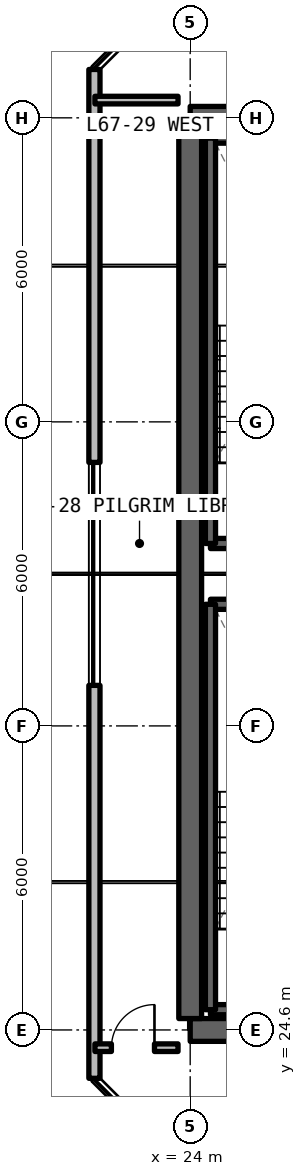
"""IFC4 building model, lengths in metres.
Left out: names, types, materials, properties, quantities, classifications, styles, units other than length and angle.
Written with IfcOpenShell. Run it as: python <this file> out.ifc"""

import sys

from ifc_helpers import new_model, si_unit, direction, frame, frame_2d, origin, place, context, subcontext, project, spatial, rectangle, extrude, element, fill, save


model = new_model("IFC4")
c1 = context("Model", 3, precision=1e-05, world=origin(), true_north=direction((0.0, 1.0)))
c2 = subcontext(c1, "Body", "Model", "MODEL_VIEW")
j1 = project(units=[si_unit("LENGTHUNIT", "METRE"), si_unit("PLANEANGLEUNIT", "RADIAN")], contexts=[c1])
p1 = place(None, origin())
s1 = spatial("IfcSite", under=j1, at=p1, CompositionType="ELEMENT")
p2 = place(p1, origin())
s2 = spatial("IfcBuilding", under=s1, at=p2, CompositionType="ELEMENT")
p3 = place(p2, frame((0.0, 0.0, 239.25)))
s3 = spatial("IfcBuildingStorey", under=s2, at=p3, CompositionType="ELEMENT", Elevation=239.25)
p4 = place(p3, frame((24.0, 24.6, 0.0), z_axis=(0.0, 0.0, 1.0), x_axis=(1.0, 0.0, 0.0)))
e1 = element("IfcWall", 1, at=p4, inside=s3, PredefinedType="SHEAR", context=c2, shape_type="SweptSolid", body=[
    extrude(rectangle(XDim=12.0, YDim=0.45, at=frame_2d((6.0, 0.0))), origin(), (0.0, 0.0, 1.0), 3.3),
])
p5 = place(p4, frame((7.2, 0.0, 0.0)))
e2 = element("IfcOpeningElement", 2, at=p5, cuts=e1, PredefinedType="OPENING", context=c2, shape_type="SweptSolid", body=[
    extrude(rectangle(XDim=1.0, YDim=2.15, at=frame_2d((0.5, 1.075))), frame((0.0, 0.235, 0.0), z_axis=(0.0, -1.0, 0.0), x_axis=(1.0, 0.0, 0.0)), (0.0, 0.0, 1.0), 0.47),
])
p6 = place(p3, frame((36.0, 42.6, 0.0), z_axis=(0.0, 0.0, 1.0), x_axis=(-1.0, 0.0, 0.0)))
e3 = element("IfcWall", 3, at=p6, inside=s3, PredefinedType="SHEAR", context=c2, shape_type="SweptSolid", body=[
    extrude(rectangle(XDim=12.0, YDim=0.45, at=frame_2d((6.0, 0.0))), origin(), (0.0, 0.0, 1.0), 3.3),
])
p7 = place(p6, frame((3.8, 0.0, 0.0)))
e4 = element("IfcOpeningElement", 4, at=p7, cuts=e3, PredefinedType="OPENING", context=c2, shape_type="SweptSolid", body=[
    extrude(rectangle(XDim=1.0, YDim=2.15, at=frame_2d((0.5, 1.075))), frame((0.0, 0.235, 0.0), z_axis=(0.0, -1.0, 0.0), x_axis=(1.0, 0.0, 0.0)), (0.0, 0.0, 1.0), 0.47),
])
p8 = place(p3, frame((24.0, 24.825, 0.0), z_axis=(0.0, 0.0, 1.0), x_axis=(0.0, 1.0, 0.0)))
e5 = element("IfcWall", 5, at=p8, inside=s3, PredefinedType="SHEAR", context=c2, shape_type="SweptSolid", body=[
    extrude(rectangle(XDim=17.55, YDim=0.45, at=frame_2d((8.775, 0.0))), origin(), (0.0, 0.0, 1.0), 3.3),
])
p9 = place(p3, frame((22.11, 43.554, 0.0), z_axis=(0.0, 0.0, 1.0), x_axis=(0.0, -1.0, 0.0)))
e6 = element("IfcWall", 6, at=p9, inside=s3, PredefinedType="SOLIDWALL", context=c2, shape_type="SweptSolid", body=[
    extrude(rectangle(XDim=19.909, YDim=0.22, at=frame_2d((9.955, 0.0))), origin(), (0.0, 0.0, 1.0), 3.08),
])
p10 = place(p9, frame((7.754, 0.0, 0.78)))
e7 = element("IfcOpeningElement", 7, at=p10, cuts=e6, PredefinedType="OPENING", context=c2, shape_type="SweptSolid", body=[
    extrude(rectangle(XDim=4.4, YDim=1.66, at=frame_2d((2.2, 0.83))), frame((0.0, 0.12, 0.0), z_axis=(0.0, -1.0, 0.0), x_axis=(1.0, 0.0, 0.0)), (0.0, 0.0, 1.0), 0.24),
])
p11 = place(p3, frame((22.12, 24.25, 0.0), z_axis=(0.0, 0.0, 1.0), x_axis=(1.0, 0.0, 0.0)))
e8 = element("IfcWall", 8, at=p11, inside=s3, PredefinedType="SOLIDWALL", context=c2, shape_type="SweptSolid", body=[
    extrude(rectangle(XDim=1.64, YDim=0.15, at=frame_2d((0.82, 0.0))), origin(), (0.0, 0.0, 1.0), 2.35),
])
p12 = place(p11, frame((0.325, 0.0, 0.0)))
e9 = element("IfcOpeningElement", 9, at=p12, cuts=e8, PredefinedType="OPENING", context=c2, shape_type="SweptSolid", body=[
    extrude(rectangle(XDim=0.85, YDim=2.1, at=frame_2d((0.425, 1.05))), frame((0.0, 0.085, 0.0), z_axis=(0.0, -1.0, 0.0), x_axis=(1.0, 0.0, 0.0)), (0.0, 0.0, 1.0), 0.17),
])
p13 = place(p3, frame((22.12, 42.95, 0.0), z_axis=(0.0, 0.0, 1.0), x_axis=(1.0, 0.0, 0.0)))
e10 = element("IfcWall", 10, at=p13, inside=s3, PredefinedType="SOLIDWALL", context=c2, shape_type="SweptSolid", body=[
    extrude(rectangle(XDim=1.64, YDim=0.15, at=frame_2d((0.82, 0.0))), origin(), (0.0, 0.0, 1.0), 2.35),
])
for number, where, z_axis, x_axis in (
    (11, (24.4, 25.0, 0.0), (0.0, 0.0, 1.0), (1.0, 0.0, 0.0)),
    (12, (27.8, 33.0, 0.0), (0.0, 0.0, 1.0), (-1.0, 0.0, 0.0)),
):
    element("IfcWall", number, at=place(p3, frame(where, z_axis=z_axis, x_axis=x_axis)), inside=s3, PredefinedType="SOLIDWALL", context=c2, shape_type="SweptSolid", body=[
        extrude(rectangle(XDim=3.4, YDim=0.2, at=frame_2d((1.7, 0.0))), origin(), (0.0, 0.0, 1.0), 3.3),
    ])
p14 = place(p3, frame((24.4, 33.0, 0.0), z_axis=(0.0, 0.0, 1.0), x_axis=(0.0, -1.0, 0.0)))
e13 = element("IfcWall", 13, at=p14, inside=s3, PredefinedType="SOLIDWALL", context=c2, shape_type="SweptSolid", body=[
    extrude(rectangle(XDim=8.0, YDim=0.2, at=frame_2d((4.0, 0.0))), origin(), (0.0, 0.0, 1.0), 3.3),
])
for number, where, z_axis, x_axis in (
    (14, (24.4, 34.2, 0.0), (0.0, 0.0, 1.0), (1.0, 0.0, 0.0)),
    (15, (27.8, 42.2, 0.0), (0.0, 0.0, 1.0), (-1.0, 0.0, 0.0)),
):
    element("IfcWall", number, at=place(p3, frame(where, z_axis=z_axis, x_axis=x_axis)), inside=s3, PredefinedType="SOLIDWALL", context=c2, shape_type="SweptSolid", body=[
        extrude(rectangle(XDim=3.4, YDim=0.2, at=frame_2d((1.7, 0.0))), origin(), (0.0, 0.0, 1.0), 3.3),
    ])
p15 = place(p3, frame((24.4, 42.2, 0.0), z_axis=(0.0, 0.0, 1.0), x_axis=(0.0, -1.0, 0.0)))
e16 = element("IfcWall", 16, at=p15, inside=s3, PredefinedType="SOLIDWALL", context=c2, shape_type="SweptSolid", body=[
    extrude(rectangle(XDim=8.0, YDim=0.2, at=frame_2d((4.0, 0.0))), origin(), (0.0, 0.0, 1.0), 3.3),
])
p16 = place(p10, origin())
e17 = element("IfcWindow", 17, at=p16, inside=s3, PartitioningType="SINGLE_PANEL", PredefinedType="WINDOW", context=c2, shape_type="SweptSolid", body=[
    extrude(rectangle(XDim=4.4, YDim=1.66, at=frame_2d((2.2, 0.83))), frame((0.0, 0.03, 0.0), z_axis=(0.0, -1.0, 0.0), x_axis=(1.0, 0.0, 0.0)), (0.0, 0.0, 1.0), 0.06),
])
fill(e7, e17)
p17 = place(p12, origin())
e18 = element("IfcDoor", 18, at=p17, inside=s3, OperationType="SINGLE_SWING_RIGHT", PredefinedType="DOOR", context=c2, shape_type="SweptSolid", body=[
    extrude(rectangle(XDim=0.85, YDim=2.1, at=frame_2d((0.425, 1.05))), frame((0.0, 0.025, 0.0), z_axis=(0.0, -1.0, 0.0), x_axis=(1.0, 0.0, 0.0)), (0.0, 0.0, 1.0), 0.05),
])
fill(e9, e18)
save(model, sys.argv[1])
